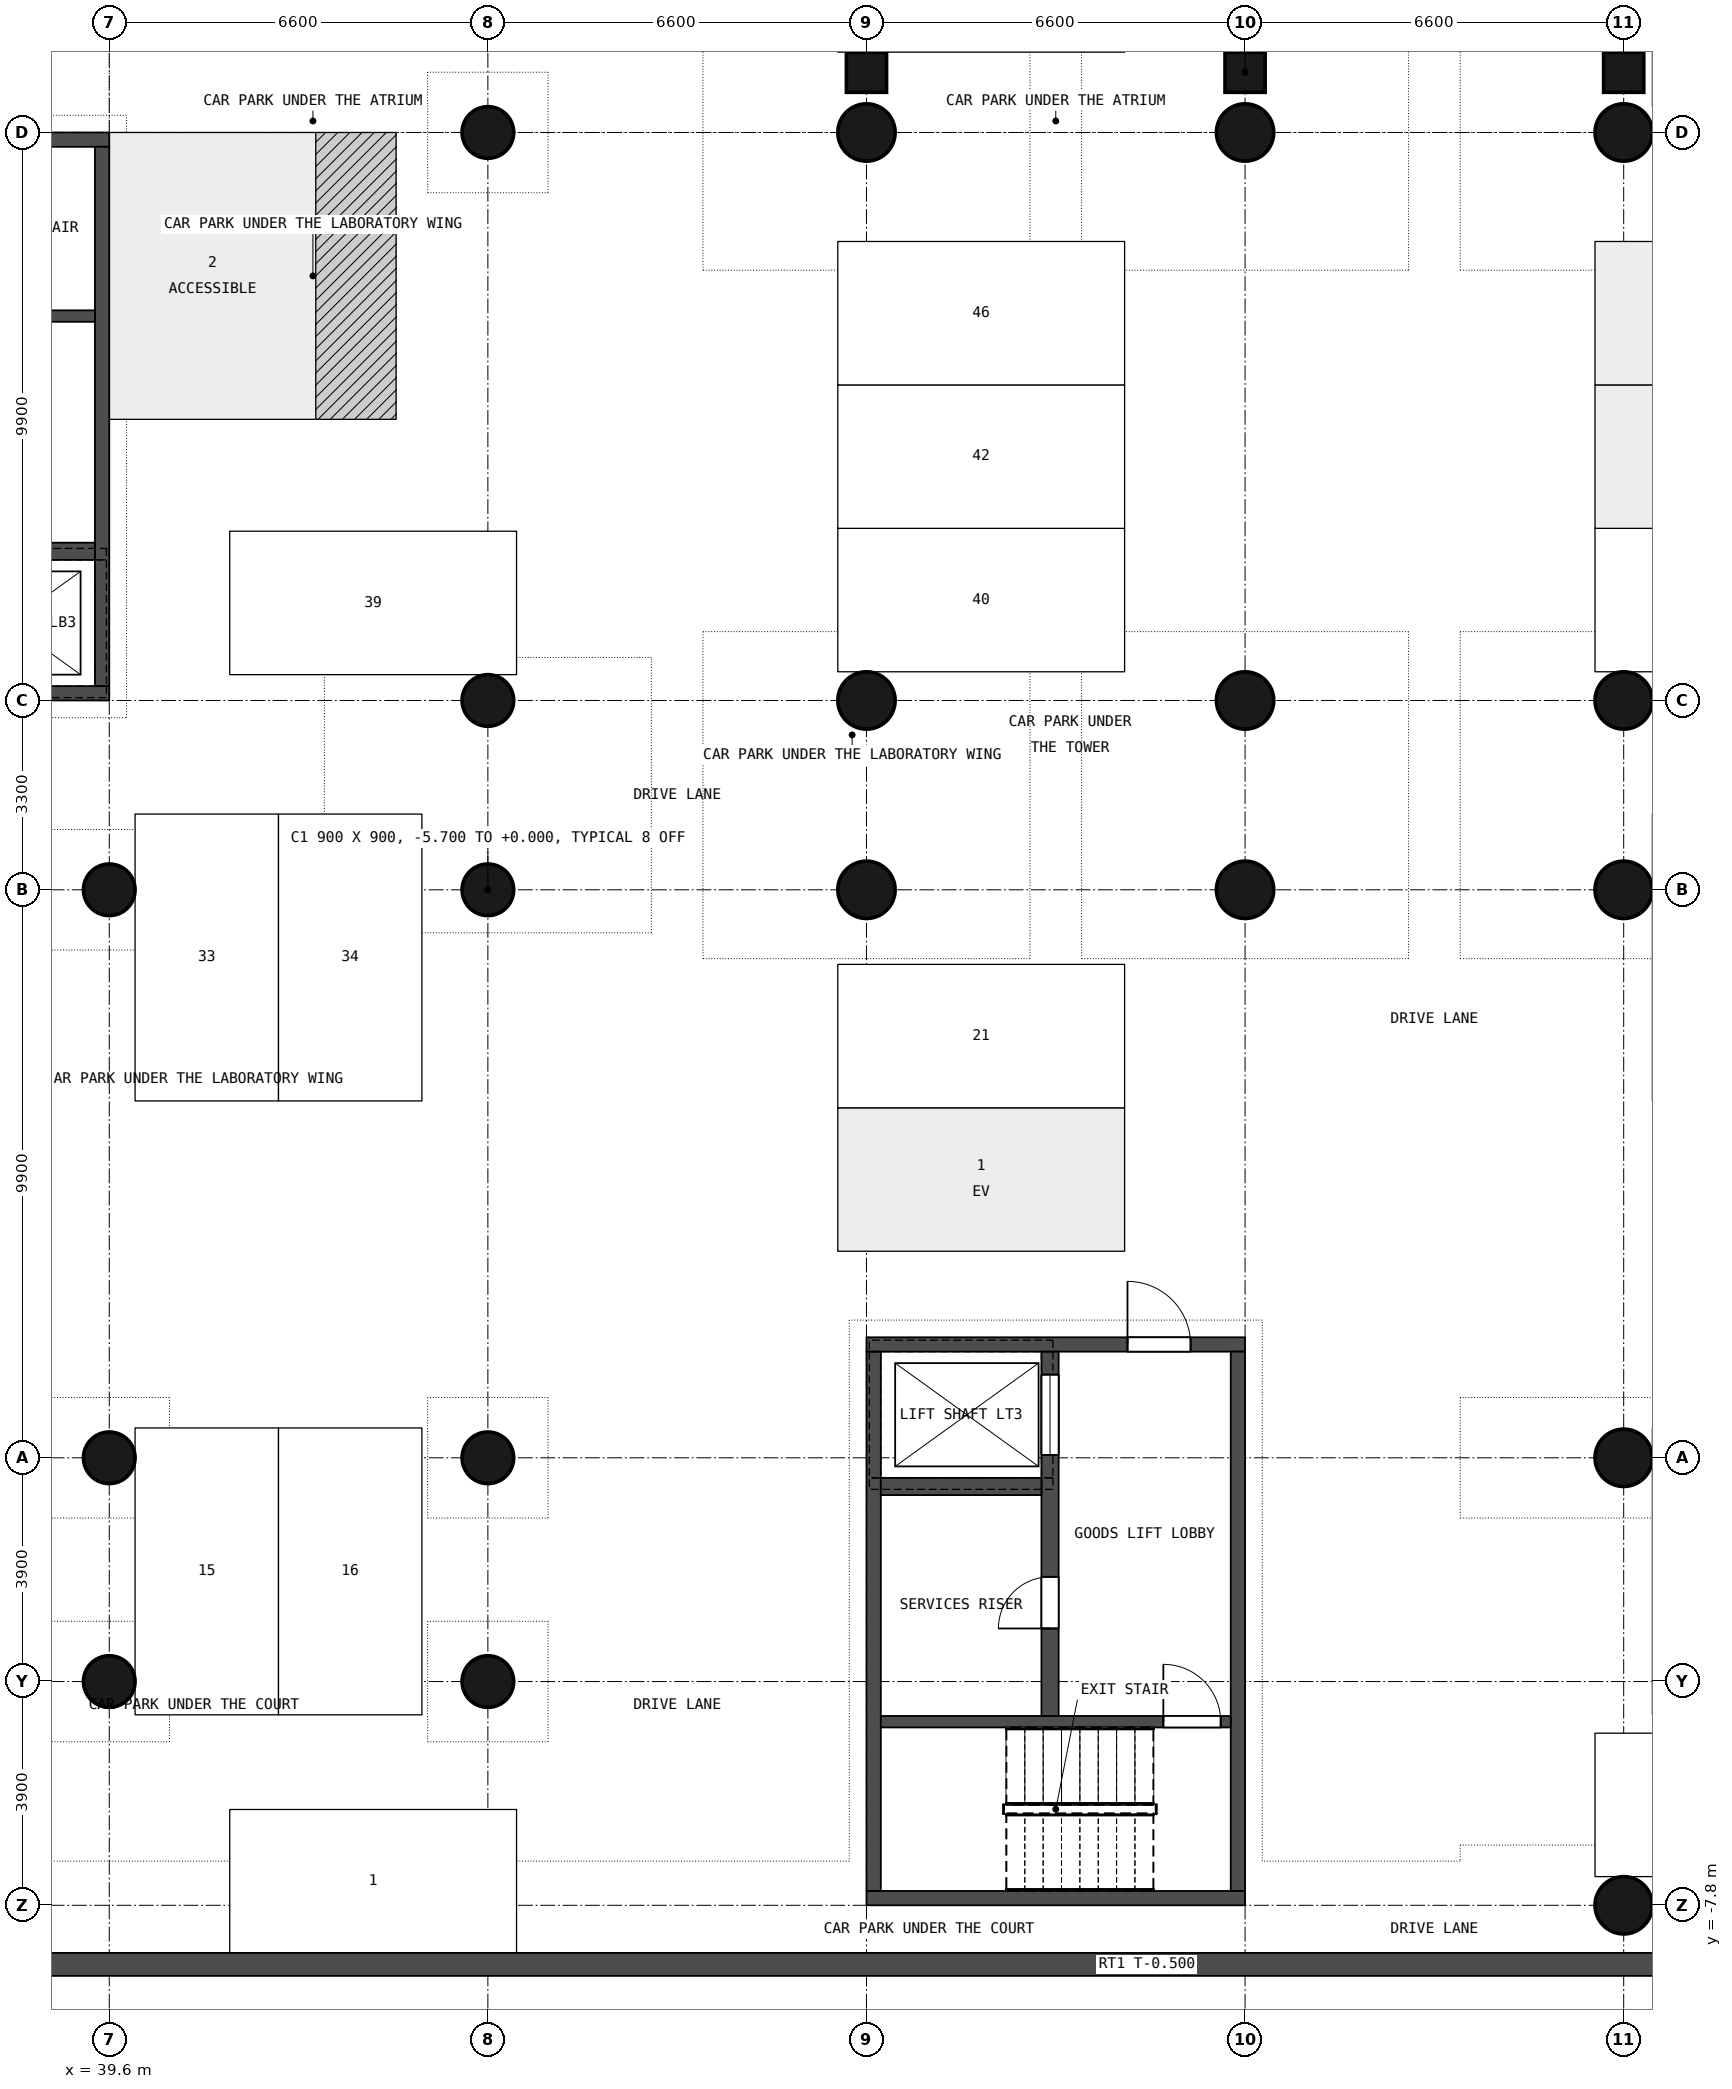
"""IFC4 building model, lengths in metres.
Left out: names, types, materials, properties, quantities, classifications, styles, units other than length and angle.
Written with IfcOpenShell. Run it as: python <this file> out.ifc"""

import sys

from ifc_helpers import new_model, si_unit, direction, frame, frame_2d, origin, origin_2d, place, context, subcontext, project, spatial, rectangle, circle, extrude, element, fill, save


model = new_model("IFC4")
c1 = context("Model", 3, precision=1e-05, world=origin(), true_north=direction((0.0, 1.0)))
c2 = subcontext(c1, "Body", "Model", "MODEL_VIEW")
j1 = project(units=[si_unit("LENGTHUNIT", "METRE"), si_unit("PLANEANGLEUNIT", "RADIAN")], contexts=[c1])
p1 = place(None, origin())
s1 = spatial("IfcSite", under=j1, at=p1, CompositionType="ELEMENT")
p2 = place(p1, origin())
s2 = spatial("IfcBuilding", under=s1, at=p2, CompositionType="ELEMENT")
p3 = place(p2, frame((0.0, 0.0, -5.7)))
s3 = spatial("IfcBuildingStorey", under=s2, at=p3, CompositionType="ELEMENT", Elevation=-5.7)
for number, where, z_axis, x_axis in (
    (1, (39.6, 0.0, 0.0), (0.0, 0.0, 1.0), (1.0, 0.0, 0.0)),
    (2, (39.6, 9.9, 0.0), (0.0, 0.0, 1.0), (1.0, 0.0, 0.0)),
    (3, (46.2, 0.0, 0.0), (0.0, 0.0, 1.0), (1.0, 0.0, 0.0)),
    (4, (46.2, 9.9, 0.0), (0.0, 0.0, 1.0), (1.0, 0.0, 0.0)),
    (5, (46.2, 13.2, 0.0), (0.0, 0.0, 1.0), (1.0, 0.0, 0.0)),
    (6, (46.2, 23.1, 0.0), (0.0, 0.0, 1.0), (1.0, 0.0, 0.0)),
):
    element("IfcColumn", number, at=place(p3, frame(where, z_axis=z_axis, x_axis=x_axis)), inside=s3, PredefinedType="COLUMN", context=c2, shape_type="SweptSolid", body=[
        extrude(circle(Radius=0.45, at=origin_2d()), origin(), (0.0, 0.0, 1.0), 5.7),
    ])
for number, where, z_axis, x_axis in (
    (7, (52.8, 9.9, 0.0), (0.0, 0.0, 1.0), (1.0, 0.0, 0.0)),
    (8, (52.8, 13.2, 0.0), (0.0, 0.0, 1.0), (1.0, 0.0, 0.0)),
    (9, (52.8, 23.1, 0.0), (0.0, 0.0, 1.0), (1.0, 0.0, 0.0)),
    (10, (59.4, 9.9, 0.0), (0.0, 0.0, 1.0), (1.0, 0.0, 0.0)),
    (11, (59.4, 13.2, 0.0), (0.0, 0.0, 1.0), (1.0, 0.0, 0.0)),
    (12, (59.4, 23.1, 0.0), (0.0, 0.0, 1.0), (1.0, 0.0, 0.0)),
    (13, (66.0, -7.8, 0.0), (0.0, 0.0, 1.0), (1.0, 0.0, 0.0)),
    (14, (66.0, 0.0, 0.0), (0.0, 0.0, 1.0), (1.0, 0.0, 0.0)),
    (15, (66.0, 9.9, 0.0), (0.0, 0.0, 1.0), (1.0, 0.0, 0.0)),
    (16, (66.0, 13.2, 0.0), (0.0, 0.0, 1.0), (1.0, 0.0, 0.0)),
    (17, (66.0, 23.1, 0.0), (0.0, 0.0, 1.0), (1.0, 0.0, 0.0)),
):
    element("IfcColumn", number, at=place(p3, frame(where, z_axis=z_axis, x_axis=x_axis)), inside=s3, PredefinedType="COLUMN", context=c2, shape_type="SweptSolid", body=[
        extrude(circle(Radius=0.5, at=origin_2d()), origin(), (0.0, 0.0, 1.0), 5.7),
    ])
for number, where, z_axis, x_axis in (
    (18, (39.6, -3.9, 0.0), (0.0, 0.0, 1.0), (1.0, 0.0, 0.0)),
    (19, (46.2, -3.9, 0.0), (0.0, 0.0, 1.0), (1.0, 0.0, 0.0)),
):
    element("IfcColumn", number, at=place(p3, frame(where, z_axis=z_axis, x_axis=x_axis)), inside=s3, PredefinedType="COLUMN", context=c2, shape_type="SweptSolid", body=[
        extrude(circle(Radius=0.45, at=origin_2d()), origin(), (0.0, 0.0, 1.0), 5.7),
    ])
for number, where, z_axis, x_axis in (
    (20, (52.8, 24.15, 0.0), (0.0, 0.0, 1.0), (1.0, 0.0, 0.0)),
    (21, (59.4, 24.15, 0.0), (0.0, 0.0, 1.0), (1.0, 0.0, 0.0)),
    (22, (66.0, 24.15, 0.0), (0.0, 0.0, 1.0), (1.0, 0.0, 0.0)),
):
    element("IfcColumn", number, at=place(p3, frame(where, z_axis=z_axis, x_axis=x_axis)), inside=s3, PredefinedType="COLUMN", context=c2, shape_type="SweptSolid", body=[
        extrude(rectangle(XDim=0.7, YDim=0.7, at=origin_2d()), origin(), (0.0, 0.0, 1.0), 5.7),
    ])
p4 = place(p3, frame((33.0, 13.325, 0.0), z_axis=(0.0, 0.0, 1.0), x_axis=(1.0, 0.0, 0.0)))
e23 = element("IfcWall", 23, at=p4, inside=s3, PredefinedType="SHEAR", context=c2, shape_type="SweptSolid", body=[
    extrude(rectangle(XDim=6.6, YDim=0.25, at=frame_2d((3.3, 0.0))), origin(), (0.0, 0.0, 1.0), 5.4),
])
p5 = place(p4, frame((0.95, 0.0, 0.0)))
e24 = element("IfcOpeningElement", 24, at=p5, cuts=e23, PredefinedType="OPENING", context=c2, shape_type="SweptSolid", body=[
    extrude(rectangle(XDim=1.1, YDim=2.1, at=frame_2d((0.55, 1.05))), frame((0.0, 0.135, 0.0), z_axis=(0.0, -1.0, 0.0), x_axis=(1.0, 0.0, 0.0)), (0.0, 0.0, 1.0), 0.27),
])
p6 = place(p3, frame((33.0, 22.975, 0.0), z_axis=(0.0, 0.0, 1.0), x_axis=(1.0, 0.0, 0.0)))
e25 = element("IfcWall", 25, at=p6, inside=s3, PredefinedType="SHEAR", context=c2, shape_type="SweptSolid", body=[
    extrude(rectangle(XDim=6.6, YDim=0.25, at=frame_2d((3.3, 0.0))), origin(), (0.0, 0.0, 1.0), 5.4),
])
p7 = place(p3, frame((39.475, 13.45, 0.0), z_axis=(0.0, 0.0, 1.0), x_axis=(0.0, 1.0, 0.0)))
e26 = element("IfcWall", 26, at=p7, inside=s3, PredefinedType="SHEAR", context=c2, shape_type="SweptSolid", body=[
    extrude(rectangle(XDim=9.4, YDim=0.25, at=frame_2d((4.7, 0.0))), origin(), (0.0, 0.0, 1.0), 5.4),
])
p8 = place(p3, frame((33.25, 19.9, 0.0), z_axis=(0.0, 0.0, 1.0), x_axis=(1.0, 0.0, 0.0)))
e27 = element("IfcWall", 27, at=p8, inside=s3, PredefinedType="SHEAR", context=c2, shape_type="SweptSolid", body=[
    extrude(rectangle(XDim=6.1, YDim=0.2, at=frame_2d((3.05, 0.0))), origin(), (0.0, 0.0, 1.0), 5.4),
])
p9 = place(p8, frame((0.175, 0.0, 0.0)))
e28 = element("IfcOpeningElement", 28, at=p9, cuts=e27, PredefinedType="OPENING", context=c2, shape_type="SweptSolid", body=[
    extrude(rectangle(XDim=1.0, YDim=2.1, at=frame_2d((0.5, 1.05))), frame((0.0, 0.11, 0.0), z_axis=(0.0, -1.0, 0.0), x_axis=(1.0, 0.0, 0.0)), (0.0, 0.0, 1.0), 0.22),
])
p10 = place(p3, frame((36.55, 15.8, 0.0), z_axis=(0.0, 0.0, 1.0), x_axis=(1.0, 0.0, 0.0)))
e29 = element("IfcWall", 29, at=p10, inside=s3, PredefinedType="SHEAR", context=c2, shape_type="SweptSolid", body=[
    extrude(rectangle(XDim=2.8, YDim=0.3, at=frame_2d((1.4, 0.0))), origin(), (0.0, 0.0, 1.0), 5.4),
])
for number, where, z_axis, x_axis in (
    (30, (36.35, 13.35, -1.2), (0.0, 0.0, 1.0), (1.0, 0.0, 0.0)),
    (31, (36.35, 15.75, -1.2), (0.0, 0.0, 1.0), (1.0, 0.0, 0.0)),
):
    element("IfcWall", number, at=place(p3, frame(where, z_axis=z_axis, x_axis=x_axis)), inside=s3, PredefinedType="SHEAR", context=c2, shape_type="SweptSolid", body=[
        extrude(rectangle(XDim=3.2, YDim=0.2, at=frame_2d((1.6, 0.0))), origin(), (0.0, 0.0, 1.0), 0.6),
    ])
p11 = place(p3, frame((39.45, 13.45, -1.2), z_axis=(0.0, 0.0, 1.0), x_axis=(0.0, 1.0, 0.0)))
e32 = element("IfcWall", 32, at=p11, inside=s3, PredefinedType="SHEAR", context=c2, shape_type="SweptSolid", body=[
    extrude(rectangle(XDim=2.2, YDim=0.2, at=frame_2d((1.1, 0.0))), origin(), (0.0, 0.0, 1.0), 0.6),
])
p12 = place(p3, frame((59.4, 1.975, 0.0), z_axis=(0.0, 0.0, 1.0), x_axis=(-1.0, 0.0, 0.0)))
e33 = element("IfcWall", 33, at=p12, inside=s3, PredefinedType="SHEAR", context=c2, shape_type="SweptSolid", body=[
    extrude(rectangle(XDim=6.6, YDim=0.25, at=frame_2d((3.3, 0.0))), origin(), (0.0, 0.0, 1.0), 5.4),
])
p13 = place(p12, frame((0.95, 0.0, 0.0)))
e34 = element("IfcOpeningElement", 34, at=p13, cuts=e33, PredefinedType="OPENING", context=c2, shape_type="SweptSolid", body=[
    extrude(rectangle(XDim=1.1, YDim=2.1, at=frame_2d((0.55, 1.05))), frame((0.0, 0.135, 0.0), z_axis=(0.0, -1.0, 0.0), x_axis=(1.0, 0.0, 0.0)), (0.0, 0.0, 1.0), 0.27),
])
p14 = place(p3, frame((59.4, -7.675, 0.0), z_axis=(0.0, 0.0, 1.0), x_axis=(-1.0, 0.0, 0.0)))
e35 = element("IfcWall", 35, at=p14, inside=s3, PredefinedType="SHEAR", context=c2, shape_type="SweptSolid", body=[
    extrude(rectangle(XDim=6.6, YDim=0.25, at=frame_2d((3.3, 0.0))), origin(), (0.0, 0.0, 1.0), 5.4),
])
for number, where, z_axis, x_axis in (
    (36, (59.275, 1.85, 0.0), (0.0, 0.0, 1.0), (0.0, -1.0, 0.0)),
    (37, (52.925, 1.85, 0.0), (0.0, 0.0, 1.0), (0.0, -1.0, 0.0)),
):
    element("IfcWall", number, at=place(p3, frame(where, z_axis=z_axis, x_axis=x_axis)), inside=s3, PredefinedType="SHEAR", context=c2, shape_type="SweptSolid", body=[
        extrude(rectangle(XDim=9.4, YDim=0.25, at=frame_2d((4.7, 0.0))), origin(), (0.0, 0.0, 1.0), 5.4),
    ])
p15 = place(p3, frame((59.15, -4.6, 0.0), z_axis=(0.0, 0.0, 1.0), x_axis=(-1.0, 0.0, 0.0)))
e38 = element("IfcWall", 38, at=p15, inside=s3, PredefinedType="SHEAR", context=c2, shape_type="SweptSolid", body=[
    extrude(rectangle(XDim=6.1, YDim=0.2, at=frame_2d((3.05, 0.0))), origin(), (0.0, 0.0, 1.0), 5.4),
])
p16 = place(p15, frame((0.175, 0.0, 0.0)))
e39 = element("IfcOpeningElement", 39, at=p16, cuts=e38, PredefinedType="OPENING", context=c2, shape_type="SweptSolid", body=[
    extrude(rectangle(XDim=1.0, YDim=2.1, at=frame_2d((0.5, 1.05))), frame((0.0, 0.11, 0.0), z_axis=(0.0, -1.0, 0.0), x_axis=(1.0, 0.0, 0.0)), (0.0, 0.0, 1.0), 0.22),
])
p17 = place(p3, frame((56.0, 1.85, 0.0), z_axis=(0.0, 0.0, 1.0), x_axis=(0.0, -1.0, 0.0)))
e40 = element("IfcWall", 40, at=p17, inside=s3, PredefinedType="SHEAR", context=c2, shape_type="SweptSolid", body=[
    extrude(rectangle(XDim=6.35, YDim=0.3, at=frame_2d((3.175, 0.0))), origin(), (0.0, 0.0, 1.0), 5.4),
])
p18 = place(p17, frame((3.925, 0.0, 0.0)))
e41 = element("IfcOpeningElement", 41, at=p18, cuts=e40, PredefinedType="OPENING", context=c2, shape_type="SweptSolid", body=[
    extrude(rectangle(XDim=0.9, YDim=2.1, at=frame_2d((0.45, 1.05))), frame((0.0, 0.16, 0.0), z_axis=(0.0, -1.0, 0.0), x_axis=(1.0, 0.0, 0.0)), (0.0, 0.0, 1.0), 0.32),
])
p19 = place(p17, frame((0.4, 0.0, 0.0)))
e42 = element("IfcOpeningElement", 42, at=p19, cuts=e40, PredefinedType="OPENING", context=c2, shape_type="SweptSolid", body=[
    extrude(rectangle(XDim=1.4, YDim=2.4, at=frame_2d((0.7, 1.2))), frame((0.0, 0.16, 0.0), z_axis=(0.0, -1.0, 0.0), x_axis=(1.0, 0.0, 0.0)), (0.0, 0.0, 1.0), 0.32),
])
p20 = place(p3, frame((55.85, -0.5, 0.0), z_axis=(0.0, 0.0, 1.0), x_axis=(-1.0, 0.0, 0.0)))
e43 = element("IfcWall", 43, at=p20, inside=s3, PredefinedType="SHEAR", context=c2, shape_type="SweptSolid", body=[
    extrude(rectangle(XDim=2.8, YDim=0.3, at=frame_2d((1.4, 0.0))), origin(), (0.0, 0.0, 1.0), 5.4),
])
for number, where, z_axis, x_axis in (
    (44, (52.85, -0.45, -1.2), (0.0, 0.0, 1.0), (1.0, 0.0, 0.0)),
    (45, (52.85, 1.95, -1.2), (0.0, 0.0, 1.0), (1.0, 0.0, 0.0)),
):
    element("IfcWall", number, at=place(p3, frame(where, z_axis=z_axis, x_axis=x_axis)), inside=s3, PredefinedType="SHEAR", context=c2, shape_type="SweptSolid", body=[
        extrude(rectangle(XDim=3.2, YDim=0.2, at=frame_2d((1.6, 0.0))), origin(), (0.0, 0.0, 1.0), 0.6),
    ])
for number, where, z_axis, x_axis in (
    (46, (52.95, -0.35, -1.2), (0.0, 0.0, 1.0), (0.0, 1.0, 0.0)),
    (47, (55.95, -0.35, -1.2), (0.0, 0.0, 1.0), (0.0, 1.0, 0.0)),
):
    element("IfcWall", number, at=place(p3, frame(where, z_axis=z_axis, x_axis=x_axis)), inside=s3, PredefinedType="SHEAR", context=c2, shape_type="SweptSolid", body=[
        extrude(rectangle(XDim=2.2, YDim=0.2, at=frame_2d((1.1, 0.0))), origin(), (0.0, 0.0, 1.0), 0.6),
    ])
p21 = place(p3, frame((-0.5, -8.83, 0.0), z_axis=(0.0, 0.0, 1.0), x_axis=(1.0, 0.0, 0.0)))
e48 = element("IfcWall", 48, at=p21, inside=s3, PredefinedType="SOLIDWALL", context=c2, shape_type="SweptSolid", body=[
    extrude(rectangle(XDim=80.43, YDim=0.4, at=frame_2d((40.215, 0.0))), origin(), (0.0, 0.0, 1.0), 5.2),
])
p22 = place(p18, origin())
e49 = element("IfcDoor", 49, at=p22, inside=s3, OperationType="SINGLE_SWING_RIGHT", PredefinedType="DOOR", context=c2, shape_type="SweptSolid", body=[
    extrude(rectangle(XDim=0.9, YDim=2.1, at=frame_2d((0.45, 1.05))), frame((0.0, 0.025, 0.0), z_axis=(0.0, -1.0, 0.0), x_axis=(1.0, 0.0, 0.0)), (0.0, 0.0, 1.0), 0.05),
])
fill(e41, e49)
p23 = place(p13, origin())
e50 = element("IfcDoor", 50, at=p23, inside=s3, OperationType="SINGLE_SWING_RIGHT", PredefinedType="DOOR", context=c2, shape_type="SweptSolid", body=[
    extrude(rectangle(XDim=1.1, YDim=2.1, at=frame_2d((0.55, 1.05))), frame((0.0, 0.025, 0.0), z_axis=(0.0, -1.0, 0.0), x_axis=(1.0, 0.0, 0.0)), (0.0, 0.0, 1.0), 0.05),
])
fill(e34, e50)
p24 = place(p16, origin())
e51 = element("IfcDoor", 51, at=p24, inside=s3, OperationType="SINGLE_SWING_RIGHT", PredefinedType="DOOR", context=c2, shape_type="SweptSolid", body=[
    extrude(rectangle(XDim=1.0, YDim=2.1, at=frame_2d((0.5, 1.05))), frame((0.0, 0.025, 0.0), z_axis=(0.0, -1.0, 0.0), x_axis=(1.0, 0.0, 0.0)), (0.0, 0.0, 1.0), 0.05),
])
fill(e39, e51)
p25 = place(p19, origin())
e52 = element("IfcDoor", 52, at=p25, inside=s3, OperationType="DOUBLE_DOOR_SLIDING", PredefinedType="NOTDEFINED", context=c2, shape_type="SweptSolid", body=[
    extrude(rectangle(XDim=1.4, YDim=2.4, at=frame_2d((0.7, 1.2))), frame((0.0, 0.025, 0.0), z_axis=(0.0, -1.0, 0.0), x_axis=(1.0, 0.0, 0.0)), (0.0, 0.0, 1.0), 0.05),
])
fill(e42, e52)
save(model, sys.argv[1])
